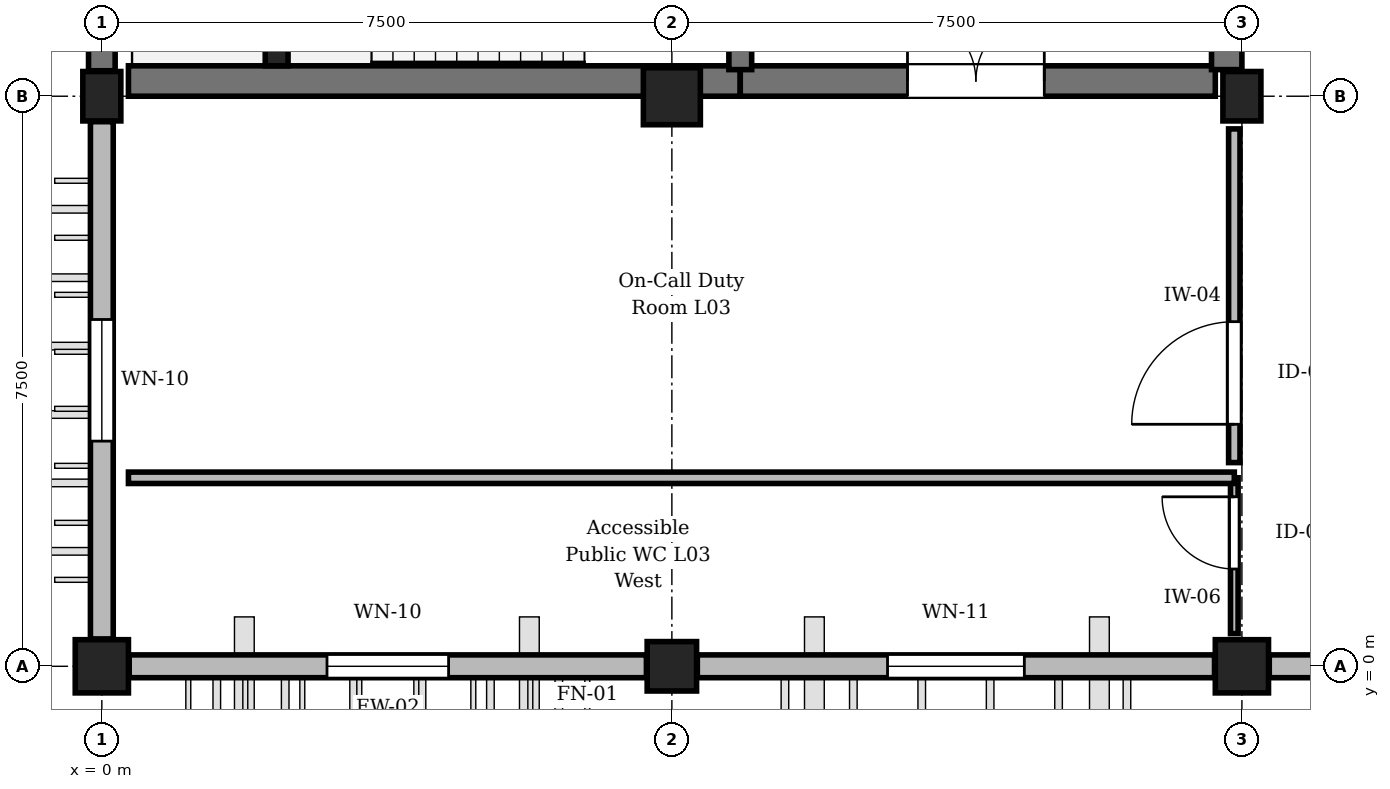
"""IFC4 building model, lengths in metres.
Left out: names, types, materials, properties, quantities, classifications, styles, units other than length and angle.
Written with IfcOpenShell. Run it as: python <this file> out.ifc"""

import sys

from ifc_helpers import new_model, si_unit, direction, frame, frame_2d, origin, origin_with_axes, origin_2d, place, context, subcontext, project, spatial, rectangle, i_section, extrude, element, fill, save


model = new_model("IFC4")
c1 = context("Model", 3, precision=1e-05, world=origin(), true_north=direction((0.0, 1.0)))
c2 = subcontext(c1, "Body", "Model", "MODEL_VIEW")
j1 = project(units=[si_unit("LENGTHUNIT", "METRE"), si_unit("PLANEANGLEUNIT", "RADIAN")], contexts=[c1])
p1 = place(None, origin())
s1 = spatial("IfcSite", under=j1, at=p1, CompositionType="ELEMENT")
p2 = place(p1, origin())
s2 = spatial("IfcBuilding", under=s1, at=p2, CompositionType="ELEMENT")
p3 = place(p2, frame((0.0, 0.0, 14.1)))
s3 = spatial("IfcBuildingStorey", under=s2, at=p3, CompositionType="ELEMENT", Elevation=14.1)
p4 = place(p3, origin_with_axes())
e1 = element("IfcColumn", 1, at=p4, inside=s3, PredefinedType="COLUMN", context=c2, shape_type="SweptSolid", body=[
    extrude(rectangle(XDim=0.7, YDim=0.7, at=origin_2d()), origin(), (0.0, 0.0, 1.0), 3.75),
])
p5 = place(p3, frame((0.0, 7.5, 0.0), z_axis=(0.0, 0.0, 1.0), x_axis=(1.0, 0.0, 0.0)))
e2 = element("IfcColumn", 2, at=p5, inside=s3, PredefinedType="COLUMN", context=c2, shape_type="SweptSolid", body=[
    extrude(rectangle(XDim=0.5, YDim=0.65, at=origin_2d()), origin(), (0.0, 0.0, 1.0), 3.75),
])
p6 = place(p3, frame((7.5, 0.0, 0.0), z_axis=(0.0, 0.0, 1.0), x_axis=(1.0, 0.0, 0.0)))
e3 = element("IfcColumn", 3, at=p6, inside=s3, PredefinedType="COLUMN", context=c2, shape_type="SweptSolid", body=[
    extrude(rectangle(XDim=0.65, YDim=0.65, at=origin_2d()), origin(), (0.0, 0.0, 1.0), 3.75),
])
p7 = place(p3, frame((7.5, 7.5, 0.0), z_axis=(0.0, 0.0, 1.0), x_axis=(1.0, 0.0, 0.0)))
e4 = element("IfcColumn", 4, at=p7, inside=s3, PredefinedType="COLUMN", context=c2, shape_type="SweptSolid", body=[
    extrude(rectangle(XDim=0.75, YDim=0.75, at=origin_2d()), origin(), (0.0, 0.0, 1.0), 3.75),
])
p8 = place(p3, frame((15.0, 0.0, 0.0), z_axis=(0.0, 0.0, 1.0), x_axis=(1.0, 0.0, 0.0)))
e5 = element("IfcColumn", 5, at=p8, inside=s3, PredefinedType="COLUMN", context=c2, shape_type="SweptSolid", body=[
    extrude(rectangle(XDim=0.7, YDim=0.7, at=origin_2d()), origin(), (0.0, 0.0, 1.0), 3.75),
])
p9 = place(p3, frame((15.0, 7.5, 0.0), z_axis=(0.0, 0.0, 1.0), x_axis=(1.0, 0.0, 0.0)))
e6 = element("IfcColumn", 6, at=p9, inside=s3, PredefinedType="COLUMN", context=c2, shape_type="SweptSolid", body=[
    extrude(rectangle(XDim=0.5, YDim=0.65, at=origin_2d()), origin(), (0.0, 0.0, 1.0), 3.75),
])
p10 = place(p3, frame((2.3, 8.05, 0.0), z_axis=(0.0, 0.0, 1.0), x_axis=(1.0, 0.0, 0.0)))
e7 = element("IfcColumn", 7, at=p10, inside=s3, PredefinedType="COLUMN", context=c2, shape_type="SweptSolid", body=[
    extrude(i_section(OverallWidth=0.3, OverallDepth=0.3, WebThickness=0.011, FlangeThickness=0.019, FilletRadius=0.027, at=origin_2d()), origin(), (0.0, 0.0, 1.0), 3.75),
])
p11 = place(p3, frame((7.165, 0.0, 0.0), z_axis=(0.0, 0.0, 1.0), x_axis=(-1.0, 0.0, 0.0)))
e8 = element("IfcWall", 8, at=p11, inside=s3, PredefinedType="STANDARD", context=c2, shape_type="SweptSolid", body=[
    extrude(rectangle(XDim=6.805, YDim=0.3, at=frame_2d((3.402, 0.0))), origin(), (0.0, 0.0, 1.0), 2.87),
])
p12 = place(p11, frame((2.603, 0.0, 0.9)))
e9 = element("IfcOpeningElement", 9, at=p12, cuts=e8, PredefinedType="OPENING", context=c2, shape_type="SweptSolid", body=[
    extrude(rectangle(XDim=1.6, YDim=1.69, at=frame_2d((0.8, 0.845))), frame((0.0, 0.16, 0.0), z_axis=(0.0, -1.0, 0.0), x_axis=(1.0, 0.0, 0.0)), (0.0, 0.0, 1.0), 0.32),
])
p13 = place(p3, frame((0.0, 0.36, 0.0), z_axis=(0.0, 0.0, 1.0), x_axis=(0.0, 1.0, 0.0)))
e10 = element("IfcWall", 10, at=p13, inside=s3, PredefinedType="STANDARD", context=c2, shape_type="SweptSolid", body=[
    extrude(rectangle(XDim=6.805, YDim=0.3, at=frame_2d((3.402, 0.0))), origin(), (0.0, 0.0, 1.0), 2.87),
])
p14 = place(p13, frame((2.603, 0.0, 0.9)))
e11 = element("IfcOpeningElement", 11, at=p14, cuts=e10, PredefinedType="OPENING", context=c2, shape_type="SweptSolid", body=[
    extrude(rectangle(XDim=1.6, YDim=1.69, at=frame_2d((0.8, 0.845))), frame((0.0, 0.16, 0.0), z_axis=(0.0, -1.0, 0.0), x_axis=(1.0, 0.0, 0.0)), (0.0, 0.0, 1.0), 0.32),
])
p15 = place(p3, frame((0.0, 7.835, 0.0), z_axis=(0.0, 0.0, 1.0), x_axis=(0.0, 1.0, 0.0)))
e12 = element("IfcWall", 12, at=p15, inside=s3, PredefinedType="SHEAR", context=c2, shape_type="SweptSolid", body=[
    extrude(rectangle(XDim=6.78, YDim=0.35, at=frame_2d((3.39, 0.0))), origin(), (0.0, 0.0, 1.0), 3.47),
])
p16 = place(p3, frame((14.64, 0.0, 0.0), z_axis=(0.0, 0.0, 1.0), x_axis=(-1.0, 0.0, 0.0)))
e13 = element("IfcWall", 13, at=p16, inside=s3, PredefinedType="STANDARD", context=c2, shape_type="SweptSolid", body=[
    extrude(rectangle(XDim=6.805, YDim=0.3, at=frame_2d((3.402, 0.0))), origin(), (0.0, 0.0, 1.0), 2.87),
])
p17 = place(p16, frame((2.502, 0.0, 0.9)))
e14 = element("IfcOpeningElement", 14, at=p17, cuts=e13, PredefinedType="OPENING", context=c2, shape_type="SweptSolid", body=[
    extrude(rectangle(XDim=1.8, YDim=1.69, at=frame_2d((0.9, 0.845))), frame((0.0, 0.16, 0.0), z_axis=(0.0, -1.0, 0.0), x_axis=(1.0, 0.0, 0.0)), (0.0, 0.0, 1.0), 0.32),
])
p18 = place(p3, frame((22.165, 0.0, 0.0), z_axis=(0.0, 0.0, 1.0), x_axis=(-1.0, 0.0, 0.0)))
e15 = element("IfcWall", 15, at=p18, inside=s3, PredefinedType="STANDARD", context=c2, shape_type="SweptSolid", body=[
    extrude(rectangle(XDim=6.805, YDim=0.3, at=frame_2d((3.402, 0.0))), origin(), (0.0, 0.0, 1.0), 2.87),
])
p19 = place(p18, frame((2.403, 0.0, 0.9)))
e16 = element("IfcOpeningElement", 16, at=p19, cuts=e15, PredefinedType="OPENING", context=c2, shape_type="SweptSolid", body=[
    extrude(rectangle(XDim=2.0, YDim=1.69, at=frame_2d((1.0, 0.845))), frame((0.0, 0.16, 0.0), z_axis=(0.0, -1.0, 0.0), x_axis=(1.0, 0.0, 0.0)), (0.0, 0.0, 1.0), 0.32),
])
p20 = place(p3, frame((0.35, 7.7, 0.0), z_axis=(0.0, 0.0, 1.0), x_axis=(1.0, 0.0, 0.0)))
e17 = element("IfcWall", 17, at=p20, inside=s3, PredefinedType="SHEAR", context=c2, shape_type="SweptSolid", body=[
    extrude(rectangle(XDim=8.05, YDim=0.4, at=frame_2d((4.025, 0.0))), origin(), (0.0, 0.0, 1.0), 3.47),
])
p21 = place(p3, frame((8.4, 7.7, 0.0), z_axis=(0.0, 0.0, 1.0), x_axis=(1.0, 0.0, 0.0)))
e18 = element("IfcWall", 18, at=p21, inside=s3, PredefinedType="SHEAR", context=c2, shape_type="SweptSolid", body=[
    extrude(rectangle(XDim=6.25, YDim=0.4, at=frame_2d((3.125, 0.0))), origin(), (0.0, 0.0, 1.0), 3.47),
])
p22 = place(p21, frame((2.2, 0.0, 0.0)))
e19 = element("IfcOpeningElement", 19, at=p22, cuts=e18, PredefinedType="OPENING", context=c2, shape_type="SweptSolid", body=[
    extrude(rectangle(XDim=1.8, YDim=2.25, at=frame_2d((0.9, 1.125))), frame((0.0, 0.21, 0.0), z_axis=(0.0, -1.0, 0.0), x_axis=(1.0, 0.0, 0.0)), (0.0, 0.0, 1.0), 0.42),
])
p23 = place(p3, frame((14.8, 7.85, 0.0), z_axis=(0.0, 0.0, 1.0), x_axis=(0.0, 1.0, 0.0)))
e20 = element("IfcWall", 20, at=p23, inside=s3, PredefinedType="SHEAR", context=c2, shape_type="SweptSolid", body=[
    extrude(rectangle(XDim=3.75, YDim=0.4, at=frame_2d((1.875, 0.0))), origin(), (0.0, 0.0, 1.0), 3.47),
])
p24 = place(p3, frame((8.4, 11.5, 0.0), z_axis=(0.0, 0.0, 1.0), x_axis=(0.0, -1.0, 0.0)))
e21 = element("IfcWall", 21, at=p24, inside=s3, PredefinedType="SHEAR", context=c2, shape_type="SweptSolid", body=[
    extrude(rectangle(XDim=3.65, YDim=0.3, at=frame_2d((1.825, 0.0))), origin(), (0.0, 0.0, 1.0), 3.47),
])
p25 = place(p24, frame((1.22, 0.0, 0.0)))
e22 = element("IfcOpeningElement", 22, at=p25, cuts=e21, PredefinedType="OPENING", context=c2, shape_type="SweptSolid", body=[
    extrude(rectangle(XDim=1.2, YDim=2.25, at=frame_2d((0.6, 1.125))), frame((0.0, 0.16, 0.0), z_axis=(0.0, -1.0, 0.0), x_axis=(1.0, 0.0, 0.0)), (0.0, 0.0, 1.0), 0.32),
])
p26 = place(p3, frame((14.9, 0.43, 0.0), z_axis=(0.0, 0.0, 1.0), x_axis=(0.0, 1.0, 0.0)))
e23 = element("IfcWall", 23, at=p26, inside=s3, PredefinedType="PARTITIONING", context=c2, shape_type="SweptSolid", body=[
    extrude(rectangle(XDim=2.05, YDim=0.1, at=frame_2d((1.025, 0.0))), origin(), (0.0, 0.0, 1.0), 2.905),
])
p27 = place(p26, frame((0.85, 0.0, 0.0)))
e24 = element("IfcOpeningElement", 24, at=p27, cuts=e23, PredefinedType="OPENING", context=c2, shape_type="SweptSolid", body=[
    extrude(rectangle(XDim=0.95, YDim=2.15, at=frame_2d((0.475, 1.075))), frame((0.0, 0.06, 0.0), z_axis=(0.0, -1.0, 0.0), x_axis=(1.0, 0.0, 0.0)), (0.0, 0.0, 1.0), 0.12),
])
p28 = place(p3, frame((14.9, 2.68, 0.0), z_axis=(0.0, 0.0, 1.0), x_axis=(0.0, 1.0, 0.0)))
e25 = element("IfcWall", 25, at=p28, inside=s3, PredefinedType="PARTITIONING", context=c2, shape_type="SweptSolid", body=[
    extrude(rectangle(XDim=4.39, YDim=0.15, at=frame_2d((2.195, 0.0))), origin(), (0.0, 0.0, 1.0), 2.905),
])
p29 = place(p28, frame((0.504, 0.0, 0.0)))
e26 = element("IfcOpeningElement", 26, at=p29, cuts=e25, PredefinedType="OPENING", context=c2, shape_type="SweptSolid", body=[
    extrude(rectangle(XDim=1.35, YDim=2.25, at=frame_2d((0.675, 1.125))), frame((0.0, 0.085, 0.0), z_axis=(0.0, -1.0, 0.0), x_axis=(1.0, 0.0, 0.0)), (0.0, 0.0, 1.0), 0.17),
])
p30 = place(p3, frame((0.35, 2.48, 0.0), z_axis=(0.0, 0.0, 1.0), x_axis=(1.0, 0.0, 0.0)))
e27 = element("IfcWall", 27, at=p30, inside=s3, PredefinedType="PARTITIONING", context=c2, shape_type="SweptSolid", body=[
    extrude(rectangle(XDim=14.55, YDim=0.15, at=frame_2d((7.275, 0.0))), origin(), (0.0, 0.0, 1.0), 3.455),
])
p31 = place(p12, origin())
e28 = element("IfcWindow", 28, at=p31, inside=s3, PartitioningType="SINGLE_PANEL", PredefinedType="WINDOW", context=c2, shape_type="SweptSolid", body=[
    extrude(rectangle(XDim=1.6, YDim=1.69, at=frame_2d((0.8, 0.845))), frame((0.0, 0.03, 0.0), z_axis=(0.0, -1.0, 0.0), x_axis=(1.0, 0.0, 0.0)), (0.0, 0.0, 1.0), 0.06),
])
fill(e9, e28)
p32 = place(p14, origin())
e29 = element("IfcWindow", 29, at=p32, inside=s3, PartitioningType="SINGLE_PANEL", PredefinedType="WINDOW", context=c2, shape_type="SweptSolid", body=[
    extrude(rectangle(XDim=1.6, YDim=1.69, at=frame_2d((0.8, 0.845))), frame((0.0, 0.03, 0.0), z_axis=(0.0, -1.0, 0.0), x_axis=(1.0, 0.0, 0.0)), (0.0, 0.0, 1.0), 0.06),
])
fill(e11, e29)
p33 = place(p17, origin())
e30 = element("IfcWindow", 30, at=p33, inside=s3, PartitioningType="SINGLE_PANEL", PredefinedType="WINDOW", context=c2, shape_type="SweptSolid", body=[
    extrude(rectangle(XDim=1.8, YDim=1.69, at=frame_2d((0.9, 0.845))), frame((0.0, 0.03, 0.0), z_axis=(0.0, -1.0, 0.0), x_axis=(1.0, 0.0, 0.0)), (0.0, 0.0, 1.0), 0.06),
])
fill(e14, e30)
p34 = place(p22, origin())
e31 = element("IfcDoor", 31, at=p34, inside=s3, OperationType="DOUBLE_DOOR_SINGLE_SWING", PredefinedType="DOOR", context=c2, shape_type="SweptSolid", body=[
    extrude(rectangle(XDim=1.8, YDim=2.25, at=frame_2d((0.9, 1.125))), frame((0.0, 0.025, 0.0), z_axis=(0.0, -1.0, 0.0), x_axis=(1.0, 0.0, 0.0)), (0.0, 0.0, 1.0), 0.05),
])
fill(e19, e31)
p35 = place(p27, origin())
e32 = element("IfcDoor", 32, at=p35, inside=s3, OperationType="SINGLE_SWING_RIGHT", PredefinedType="DOOR", context=c2, shape_type="SweptSolid", body=[
    extrude(rectangle(XDim=0.95, YDim=2.15, at=frame_2d((0.475, 1.075))), frame((0.0, 0.025, 0.0), z_axis=(0.0, -1.0, 0.0), x_axis=(1.0, 0.0, 0.0)), (0.0, 0.0, 1.0), 0.05),
])
fill(e24, e32)
p36 = place(p29, origin())
e33 = element("IfcDoor", 33, at=p36, inside=s3, OperationType="SINGLE_SWING_LEFT", PredefinedType="DOOR", context=c2, shape_type="SweptSolid", body=[
    extrude(rectangle(XDim=1.35, YDim=2.25, at=frame_2d((0.675, 1.125))), frame((0.0, 0.025, 0.0), z_axis=(0.0, -1.0, 0.0), x_axis=(1.0, 0.0, 0.0)), (0.0, 0.0, 1.0), 0.05),
])
fill(e26, e33)
save(model, sys.argv[1])
